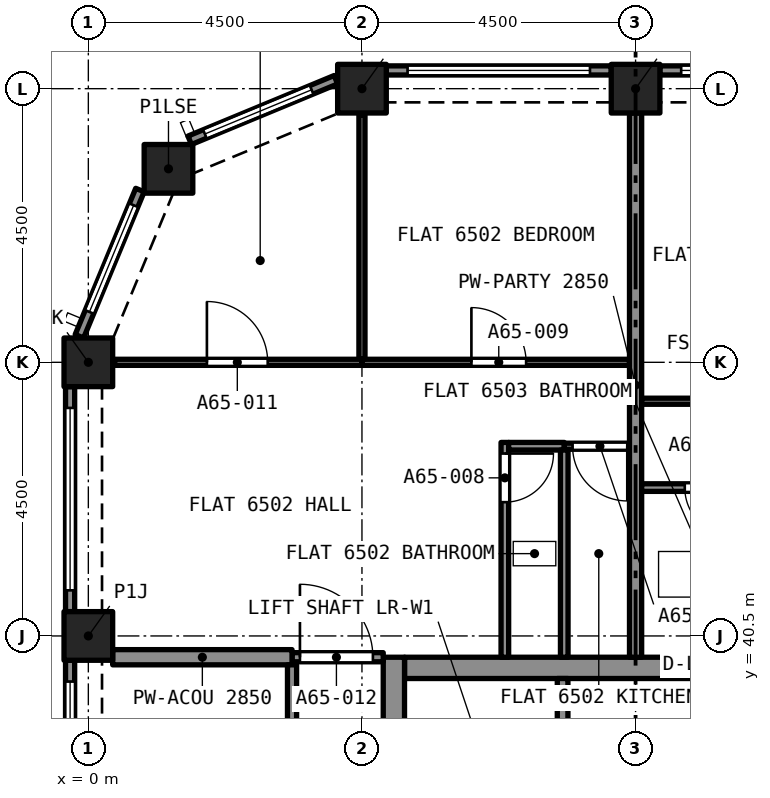
"""IFC4 building model, lengths in metres.
Left out: names, types, materials, properties, quantities, classifications, styles, units other than length and angle.
Written with IfcOpenShell. Run it as: python <this file> out.ifc"""

import sys

from ifc_helpers import new_model, si_unit, direction, frame, frame_2d, origin, origin_2d, place, context, subcontext, project, spatial, rectangle, extrude, element, fill, save


model = new_model("IFC4")
c1 = context("Model", 3, precision=1e-05, world=origin(), true_north=direction((0.0, 1.0)))
c2 = subcontext(c1, "Body", "Model", "MODEL_VIEW")
j1 = project(units=[si_unit("LENGTHUNIT", "METRE"), si_unit("PLANEANGLEUNIT", "RADIAN")], contexts=[c1])
p1 = place(None, origin())
s1 = spatial("IfcSite", under=j1, at=p1, CompositionType="ELEMENT")
p2 = place(p1, origin())
s2 = spatial("IfcBuilding", under=s1, at=p2, CompositionType="ELEMENT")
p3 = place(p2, frame((0.0, 0.0, 232.495)))
s3 = spatial("IfcBuildingStorey", under=s2, at=p3, CompositionType="ELEMENT", Elevation=232.495)
for number, where, z_axis, x_axis in (
    (1, (0.0, 40.5, 0.0), (0.0, 0.0, 1.0), (1.0, 0.0, 0.0)),
    (2, (0.0, 45.0, 0.0), (0.0, 0.0, 1.0), (1.0, 0.0, 0.0)),
    (3, (1.318, 48.182, 0.0), (0.0, 0.0, 1.0), (1.0, 0.0, 0.0)),
    (4, (4.5, 49.5, 0.0), (0.0, 0.0, 1.0), (1.0, 0.0, 0.0)),
    (5, (9.0, 49.5, 0.0), (0.0, 0.0, 1.0), (1.0, 0.0, 0.0)),
):
    element("IfcColumn", number, at=place(p3, frame(where, z_axis=z_axis, x_axis=x_axis)), inside=s3, PredefinedType="COLUMN", context=c2, shape_type="SweptSolid", body=[
        extrude(rectangle(XDim=0.8, YDim=0.8, at=origin_2d()), origin(), (0.0, 0.0, 1.0), 3.2),
    ])
p4 = place(p3, frame((5.2, 39.975, 0.0), z_axis=(0.0, 0.0, 1.0), x_axis=(1.0, 0.0, 0.0)))
e6 = element("IfcWall", 6, at=p4, inside=s3, PredefinedType="SOLIDWALL", context=c2, shape_type="SweptSolid", body=[
    extrude(rectangle(XDim=7.6, YDim=0.35, at=frame_2d((3.8, 0.0))), origin(), (0.0, 0.0, 1.0), 3.2),
])
p5 = place(p3, frame((5.025, 27.35, 0.0), z_axis=(0.0, 0.0, 1.0), x_axis=(0.0, 1.0, 0.0)))
e7 = element("IfcWall", 7, at=p5, inside=s3, PredefinedType="SOLIDWALL", context=c2, shape_type="SweptSolid", body=[
    extrude(rectangle(XDim=12.8, YDim=0.35, at=frame_2d((6.4, 0.0))), origin(), (0.0, 0.0, 1.0), 3.2),
])
p6 = place(p5, frame((8.6, 0.0, 0.0)))
e8 = element("IfcOpeningElement", 8, at=p6, cuts=e7, PredefinedType="OPENING", context=c2, shape_type="SweptSolid", body=[
    extrude(rectangle(XDim=1.2, YDim=2.1, at=frame_2d((0.6, 1.05))), frame((0.0, 0.185, 0.0), z_axis=(0.0, -1.0, 0.0), x_axis=(1.0, 0.0, 0.0)), (0.0, 0.0, 1.0), 0.37),
])
p7 = place(p3, frame((9.4, 49.8, 0.0), z_axis=(0.0, 0.0, 1.0), x_axis=(1.0, 0.0, 0.0)))
e9 = element("IfcWall", 9, at=p7, inside=s3, PredefinedType="SOLIDWALL", context=c2, shape_type="SweptSolid", body=[
    extrude(rectangle(XDim=3.7, YDim=0.15, at=frame_2d((1.85, 0.0))), origin(), (0.0, 0.0, 1.0), 3.2),
])
p8 = place(p7, frame((0.35, 0.0, 0.45)))
e10 = element("IfcOpeningElement", 10, at=p8, cuts=e9, PredefinedType="OPENING", context=c2, shape_type="SweptSolid", body=[
    extrude(rectangle(XDim=3.0, YDim=1.95, at=frame_2d((1.5, 0.975))), frame((0.0, 0.085, 0.0), z_axis=(0.0, -1.0, 0.0), x_axis=(1.0, 0.0, 0.0)), (0.0, 0.0, 1.0), 0.17),
])
p9 = place(p3, frame((4.9, 49.8, 0.0), z_axis=(0.0, 0.0, 1.0), x_axis=(1.0, 0.0, 0.0)))
e11 = element("IfcWall", 11, at=p9, inside=s3, PredefinedType="SOLIDWALL", context=c2, shape_type="SweptSolid", body=[
    extrude(rectangle(XDim=3.7, YDim=0.15, at=frame_2d((1.85, 0.0))), origin(), (0.0, 0.0, 1.0), 3.2),
])
p10 = place(p9, frame((0.35, 0.0, 0.45)))
e12 = element("IfcOpeningElement", 12, at=p10, cuts=e11, PredefinedType="OPENING", context=c2, shape_type="SweptSolid", body=[
    extrude(rectangle(XDim=3.0, YDim=1.95, at=frame_2d((1.5, 0.975))), frame((0.0, 0.085, 0.0), z_axis=(0.0, -1.0, 0.0), x_axis=(1.0, 0.0, 0.0)), (0.0, 0.0, 1.0), 0.17),
])
p11 = place(p3, frame((1.667, 48.651, 0.0), z_axis=(0.0, 0.0, 1.0), x_axis=(0.923885342263, 0.382669406082, 0.0)))
e13 = element("IfcWall", 13, at=p11, inside=s3, PredefinedType="SOLIDWALL", context=c2, shape_type="SweptSolid", body=[
    extrude(rectangle(XDim=2.602, YDim=0.15, at=frame_2d((1.301, 0.0))), origin(), (0.0, 0.0, 1.0), 3.2),
])
p12 = place(p11, frame((0.27, 0.0, 0.45)))
e14 = element("IfcOpeningElement", 14, at=p12, cuts=e13, PredefinedType="OPENING", context=c2, shape_type="SweptSolid", body=[
    extrude(rectangle(XDim=1.9, YDim=1.95, at=frame_2d((0.95, 0.975))), frame((0.0, 0.085, 0.0), z_axis=(0.0, -1.0, 0.0), x_axis=(1.0, 0.0, 0.0)), (0.0, 0.0, 1.0), 0.17),
])
p13 = place(p3, frame((-0.147, 45.429, 0.0), z_axis=(0.0, 0.0, 1.0), x_axis=(0.382669406082, 0.923885342263, 0.0)))
e15 = element("IfcWall", 15, at=p13, inside=s3, PredefinedType="SOLIDWALL", context=c2, shape_type="SweptSolid", body=[
    extrude(rectangle(XDim=2.602, YDim=0.15, at=frame_2d((1.301, 0.0))), origin(), (0.0, 0.0, 1.0), 3.2),
])
p14 = place(p13, frame((0.432, 0.0, 0.45)))
e16 = element("IfcOpeningElement", 16, at=p14, cuts=e15, PredefinedType="OPENING", context=c2, shape_type="SweptSolid", body=[
    extrude(rectangle(XDim=1.9, YDim=1.95, at=frame_2d((0.95, 0.975))), frame((0.0, 0.085, 0.0), z_axis=(0.0, -1.0, 0.0), x_axis=(1.0, 0.0, 0.0)), (0.0, 0.0, 1.0), 0.17),
])
p15 = place(p3, frame((-0.3, 40.9, 0.0), z_axis=(0.0, 0.0, 1.0), x_axis=(0.0, 1.0, 0.0)))
e17 = element("IfcWall", 17, at=p15, inside=s3, PredefinedType="SOLIDWALL", context=c2, shape_type="SweptSolid", body=[
    extrude(rectangle(XDim=3.7, YDim=0.15, at=frame_2d((1.85, 0.0))), origin(), (0.0, 0.0, 1.0), 3.2),
])
p16 = place(p15, frame((0.35, 0.0, 0.45)))
e18 = element("IfcOpeningElement", 18, at=p16, cuts=e17, PredefinedType="OPENING", context=c2, shape_type="SweptSolid", body=[
    extrude(rectangle(XDim=3.0, YDim=1.95, at=frame_2d((1.5, 0.975))), frame((0.0, 0.085, 0.0), z_axis=(0.0, -1.0, 0.0), x_axis=(1.0, 0.0, 0.0)), (0.0, 0.0, 1.0), 0.17),
])
p17 = place(p3, frame((-0.3, 36.4, 0.0), z_axis=(0.0, 0.0, 1.0), x_axis=(0.0, 1.0, 0.0)))
e19 = element("IfcWall", 19, at=p17, inside=s3, PredefinedType="SOLIDWALL", context=c2, shape_type="SweptSolid", body=[
    extrude(rectangle(XDim=3.7, YDim=0.15, at=frame_2d((1.85, 0.0))), origin(), (0.0, 0.0, 1.0), 3.2),
])
p18 = place(p17, frame((0.35, 0.0, 0.45)))
e20 = element("IfcOpeningElement", 20, at=p18, cuts=e19, PredefinedType="OPENING", context=c2, shape_type="SweptSolid", body=[
    extrude(rectangle(XDim=3.0, YDim=1.95, at=frame_2d((1.5, 0.975))), frame((0.0, 0.085, 0.0), z_axis=(0.0, -1.0, 0.0), x_axis=(1.0, 0.0, 0.0)), (0.0, 0.0, 1.0), 0.17),
])
p19 = place(p3, frame((6.85, 43.683, 0.0), z_axis=(0.0, 0.0, 1.0), x_axis=(0.0, -1.0, 0.0)))
e21 = element("IfcWall", 21, at=p19, inside=s3, PredefinedType="PARTITIONING", context=c2, shape_type="SweptSolid", body=[
    extrude(rectangle(XDim=3.533, YDim=0.125, at=frame_2d((1.766, 0.0))), origin(), (0.0, 0.0, 1.0), 2.85),
])
p20 = place(p19, frame((0.183, 0.0, 0.0)))
e22 = element("IfcOpeningElement", 22, at=p20, cuts=e21, PredefinedType="OPENING", context=c2, shape_type="SweptSolid", body=[
    extrude(rectangle(XDim=0.8, YDim=2.1, at=frame_2d((0.4, 1.05))), frame((0.0, 0.073, 0.0), z_axis=(0.0, -1.0, 0.0), x_axis=(1.0, 0.0, 0.0)), (0.0, 0.0, 1.0), 0.145),
])
p21 = place(p3, frame((6.913, 43.62, 0.0), z_axis=(0.0, 0.0, 1.0), x_axis=(1.0, 0.0, 0.0)))
e23 = element("IfcWall", 23, at=p21, inside=s3, PredefinedType="PARTITIONING", context=c2, shape_type="SweptSolid", body=[
    extrude(rectangle(XDim=0.915, YDim=0.125, at=frame_2d((0.458, 0.0))), origin(), (0.0, 0.0, 1.0), 2.85),
])
p22 = place(p3, frame((7.827, 40.15, 0.0), z_axis=(0.0, 0.0, 1.0), x_axis=(0.0, 1.0, 0.0)))
e24 = element("IfcWall", 24, at=p22, inside=s3, PredefinedType="PARTITIONING", context=c2, shape_type="SweptSolid", body=[
    extrude(rectangle(XDim=3.408, YDim=0.125, at=frame_2d((1.704, 0.0))), origin(), (0.0, 0.0, 1.0), 2.85),
])
p23 = place(p3, frame((4.5, 45.0, 0.0), z_axis=(0.0, 0.0, 1.0), x_axis=(1.0, 0.0, 0.0)))
e25 = element("IfcWall", 25, at=p23, inside=s3, PredefinedType="PARTITIONING", context=c2, shape_type="SweptSolid", body=[
    extrude(rectangle(XDim=4.4, YDim=0.1, at=frame_2d((2.2, 0.0))), origin(), (0.0, 0.0, 1.0), 2.85),
])
p24 = place(p23, frame((1.8, 0.0, 0.0)))
e26 = element("IfcOpeningElement", 26, at=p24, cuts=e25, PredefinedType="OPENING", context=c2, shape_type="SweptSolid", body=[
    extrude(rectangle(XDim=0.9, YDim=2.1, at=frame_2d((0.45, 1.05))), frame((0.0, 0.06, 0.0), z_axis=(0.0, -1.0, 0.0), x_axis=(1.0, 0.0, 0.0)), (0.0, 0.0, 1.0), 0.12),
])
p25 = place(p3, frame((4.5, 45.05, 0.0), z_axis=(0.0, 0.0, 1.0), x_axis=(0.0, 1.0, 0.0)))
e27 = element("IfcWall", 27, at=p25, inside=s3, PredefinedType="PARTITIONING", context=c2, shape_type="SweptSolid", body=[
    extrude(rectangle(XDim=4.017, YDim=0.1, at=frame_2d((2.009, 0.0))), origin(), (0.0, 0.0, 1.0), 2.85),
])
p26 = place(p3, frame((8.9, 43.62, 0.0), z_axis=(0.0, 0.0, 1.0), x_axis=(-1.0, 0.0, 0.0)))
e28 = element("IfcWall", 28, at=p26, inside=s3, PredefinedType="PARTITIONING", context=c2, shape_type="SweptSolid", body=[
    extrude(rectangle(XDim=1.073, YDim=0.1, at=frame_2d((0.536, 0.0))), origin(), (0.0, 0.0, 1.0), 2.85),
])
p27 = place(p26, frame((0.036, 0.0, 0.0)))
e29 = element("IfcOpeningElement", 29, at=p27, cuts=e28, PredefinedType="OPENING", context=c2, shape_type="SweptSolid", body=[
    extrude(rectangle(XDim=0.9, YDim=2.1, at=frame_2d((0.45, 1.05))), frame((0.0, 0.06, 0.0), z_axis=(0.0, -1.0, 0.0), x_axis=(1.0, 0.0, 0.0)), (0.0, 0.0, 1.0), 0.12),
])
p28 = place(p3, frame((0.433, 45.0, 0.0), z_axis=(0.0, 0.0, 1.0), x_axis=(1.0, 0.0, 0.0)))
e30 = element("IfcWall", 30, at=p28, inside=s3, PredefinedType="PARTITIONING", context=c2, shape_type="SweptSolid", body=[
    extrude(rectangle(XDim=4.067, YDim=0.1, at=frame_2d((2.034, 0.0))), origin(), (0.0, 0.0, 1.0), 2.85),
])
p29 = place(p28, frame((1.517, 0.0, 0.0)))
e31 = element("IfcOpeningElement", 31, at=p29, cuts=e30, PredefinedType="OPENING", context=c2, shape_type="SweptSolid", body=[
    extrude(rectangle(XDim=1.0, YDim=2.1, at=frame_2d((0.5, 1.05))), frame((0.0, 0.06, 0.0), z_axis=(0.0, -1.0, 0.0), x_axis=(1.0, 0.0, 0.0)), (0.0, 0.0, 1.0), 0.12),
])
p30 = place(p3, frame((3.35, 40.15, 0.0), z_axis=(0.0, 0.0, 1.0), x_axis=(1.0, 0.0, 0.0)))
e32 = element("IfcWall", 32, at=p30, inside=s3, PredefinedType="PARTITIONING", context=c2, shape_type="SweptSolid", body=[
    extrude(rectangle(XDim=1.5, YDim=0.15, at=frame_2d((0.75, 0.0))), origin(), (0.0, 0.0, 1.0), 2.85),
])
p31 = place(p30, frame((0.13, 0.0, 0.0)))
e33 = element("IfcOpeningElement", 33, at=p31, cuts=e32, PredefinedType="OPENING", context=c2, shape_type="SweptSolid", body=[
    extrude(rectangle(XDim=1.2, YDim=2.4, at=frame_2d((0.6, 1.2))), frame((0.0, 0.085, 0.0), z_axis=(0.0, -1.0, 0.0), x_axis=(1.0, 0.0, 0.0)), (0.0, 0.0, 1.0), 0.17),
])
p32 = place(p3, frame((0.4, 40.15, 0.0), z_axis=(0.0, 0.0, 1.0), x_axis=(1.0, 0.0, 0.0)))
e34 = element("IfcWall", 34, at=p32, inside=s3, PredefinedType="PARTITIONING", context=c2, shape_type="SweptSolid", body=[
    extrude(rectangle(XDim=2.95, YDim=0.25, at=frame_2d((1.475, 0.0))), origin(), (0.0, 0.0, 1.0), 2.85),
])
p33 = place(p3, frame((9.0, 40.15, 0.0), z_axis=(0.0, 0.0, 1.0), x_axis=(0.0, 1.0, 0.0)))
e35 = element("IfcWall", 35, at=p33, inside=s3, PredefinedType="PARTITIONING", context=c2, shape_type="SweptSolid", body=[
    extrude(rectangle(XDim=8.95, YDim=0.2, at=frame_2d((4.475, 0.0))), origin(), (0.0, 0.0, 1.0), 2.85),
])
p34 = place(p3, frame((11.418, 42.94, 0.0), z_axis=(0.0, 0.0, 1.0), x_axis=(-1.0, 0.0, 0.0)))
e36 = element("IfcWall", 36, at=p34, inside=s3, PredefinedType="PARTITIONING", context=c2, shape_type="SweptSolid", body=[
    extrude(rectangle(XDim=2.318, YDim=0.125, at=frame_2d((1.159, 0.0))), origin(), (0.0, 0.0, 1.0), 2.85),
])
p35 = place(p34, frame((0.809, 0.0, 0.0)))
e37 = element("IfcOpeningElement", 37, at=p35, cuts=e36, PredefinedType="OPENING", context=c2, shape_type="SweptSolid", body=[
    extrude(rectangle(XDim=0.8, YDim=2.1, at=frame_2d((0.4, 1.05))), frame((0.0, 0.073, 0.0), z_axis=(0.0, -1.0, 0.0), x_axis=(1.0, 0.0, 0.0)), (0.0, 0.0, 1.0), 0.145),
])
p36 = place(p3, frame((9.1, 44.36, 0.0), z_axis=(0.0, 0.0, 1.0), x_axis=(1.0, 0.0, 0.0)))
e38 = element("IfcWall", 38, at=p36, inside=s3, PredefinedType="PARTITIONING", context=c2, shape_type="SweptSolid", body=[
    extrude(rectangle(XDim=4.4, YDim=0.1, at=frame_2d((2.2, 0.0))), origin(), (0.0, 0.0, 1.0), 2.85),
])
p37 = place(p36, frame((1.65, 0.0, 0.0)))
e39 = element("IfcOpeningElement", 39, at=p37, cuts=e38, PredefinedType="OPENING", context=c2, shape_type="SweptSolid", body=[
    extrude(rectangle(XDim=1.0, YDim=2.1, at=frame_2d((0.5, 1.05))), frame((0.0, 0.06, 0.0), z_axis=(0.0, -1.0, 0.0), x_axis=(1.0, 0.0, 0.0)), (0.0, 0.0, 1.0), 0.12),
])
p38 = place(p3, frame((3.35, 36.0, 0.0), z_axis=(0.0, 0.0, 1.0), x_axis=(0.0, 1.0, 0.0)))
e40 = element("IfcWall", 40, at=p38, inside=s3, PredefinedType="PARTITIONING", context=c2, shape_type="SweptSolid", body=[
    extrude(rectangle(XDim=4.025, YDim=0.15, at=frame_2d((2.012, 0.0))), origin(), (0.0, 0.0, 1.0), 2.85),
])
p39 = place(p38, frame((1.575, 0.0, 0.0)))
e41 = element("IfcOpeningElement", 41, at=p39, cuts=e40, PredefinedType="OPENING", context=c2, shape_type="SweptSolid", body=[
    extrude(rectangle(XDim=1.0, YDim=2.1, at=frame_2d((0.5, 1.05))), frame((0.0, 0.085, 0.0), z_axis=(0.0, -1.0, 0.0), x_axis=(1.0, 0.0, 0.0)), (0.0, 0.0, 1.0), 0.17),
])
p40 = place(p3, frame((7.8, 37.5, 0.0), z_axis=(0.0, 0.0, 1.0), x_axis=(0.0, 1.0, 0.0)))
e42 = element("IfcWall", 42, at=p40, inside=s3, PredefinedType="SOLIDWALL", context=c2, shape_type="SweptSolid", body=[
    extrude(rectangle(XDim=2.3, YDim=0.175, at=frame_2d((1.15, 0.0))), origin(), (0.0, 0.0, 1.0), 2.85),
])
p41 = place(p8, origin())
e43 = element("IfcWindow", 43, at=p41, inside=s3, PartitioningType="SINGLE_PANEL", PredefinedType="WINDOW", context=c2, shape_type="SweptSolid", body=[
    extrude(rectangle(XDim=3.0, YDim=1.95, at=frame_2d((1.5, 0.975))), frame((0.0, 0.03, 0.0), z_axis=(0.0, -1.0, 0.0), x_axis=(1.0, 0.0, 0.0)), (0.0, 0.0, 1.0), 0.06),
])
fill(e10, e43)
p42 = place(p10, origin())
e44 = element("IfcWindow", 44, at=p42, inside=s3, PartitioningType="SINGLE_PANEL", PredefinedType="WINDOW", context=c2, shape_type="SweptSolid", body=[
    extrude(rectangle(XDim=3.0, YDim=1.95, at=frame_2d((1.5, 0.975))), frame((0.0, 0.03, 0.0), z_axis=(0.0, -1.0, 0.0), x_axis=(1.0, 0.0, 0.0)), (0.0, 0.0, 1.0), 0.06),
])
fill(e12, e44)
p43 = place(p12, origin())
e45 = element("IfcWindow", 45, at=p43, inside=s3, PartitioningType="SINGLE_PANEL", PredefinedType="WINDOW", context=c2, shape_type="SweptSolid", body=[
    extrude(rectangle(XDim=1.9, YDim=1.95, at=frame_2d((0.95, 0.975))), frame((0.0, 0.03, 0.0), z_axis=(0.0, -1.0, 0.0), x_axis=(1.0, 0.0, 0.0)), (0.0, 0.0, 1.0), 0.06),
])
fill(e14, e45)
p44 = place(p14, origin())
e46 = element("IfcWindow", 46, at=p44, inside=s3, PartitioningType="SINGLE_PANEL", PredefinedType="WINDOW", context=c2, shape_type="SweptSolid", body=[
    extrude(rectangle(XDim=1.9, YDim=1.95, at=frame_2d((0.95, 0.975))), frame((0.0, 0.03, 0.0), z_axis=(0.0, -1.0, 0.0), x_axis=(1.0, 0.0, 0.0)), (0.0, 0.0, 1.0), 0.06),
])
fill(e16, e46)
p45 = place(p16, origin())
e47 = element("IfcWindow", 47, at=p45, inside=s3, PartitioningType="SINGLE_PANEL", PredefinedType="WINDOW", context=c2, shape_type="SweptSolid", body=[
    extrude(rectangle(XDim=3.0, YDim=1.95, at=frame_2d((1.5, 0.975))), frame((0.0, 0.03, 0.0), z_axis=(0.0, -1.0, 0.0), x_axis=(1.0, 0.0, 0.0)), (0.0, 0.0, 1.0), 0.06),
])
fill(e18, e47)
p46 = place(p18, origin())
e48 = element("IfcWindow", 48, at=p46, inside=s3, PartitioningType="SINGLE_PANEL", PredefinedType="WINDOW", context=c2, shape_type="SweptSolid", body=[
    extrude(rectangle(XDim=3.0, YDim=1.95, at=frame_2d((1.5, 0.975))), frame((0.0, 0.03, 0.0), z_axis=(0.0, -1.0, 0.0), x_axis=(1.0, 0.0, 0.0)), (0.0, 0.0, 1.0), 0.06),
])
fill(e20, e48)
p47 = place(p20, origin())
e49 = element("IfcDoor", 49, at=p47, inside=s3, OperationType="SINGLE_SWING_LEFT", PredefinedType="DOOR", context=c2, shape_type="SweptSolid", body=[
    extrude(rectangle(XDim=0.8, YDim=2.1, at=frame_2d((0.4, 1.05))), frame((0.0, 0.025, 0.0), z_axis=(0.0, -1.0, 0.0), x_axis=(1.0, 0.0, 0.0)), (0.0, 0.0, 1.0), 0.05),
])
fill(e22, e49)
p48 = place(p24, origin())
e50 = element("IfcDoor", 50, at=p48, inside=s3, OperationType="SINGLE_SWING_RIGHT", PredefinedType="DOOR", context=c2, shape_type="SweptSolid", body=[
    extrude(rectangle(XDim=0.9, YDim=2.1, at=frame_2d((0.45, 1.05))), frame((0.0, 0.025, 0.0), z_axis=(0.0, -1.0, 0.0), x_axis=(1.0, 0.0, 0.0)), (0.0, 0.0, 1.0), 0.05),
])
fill(e26, e50)
p49 = place(p27, origin())
e51 = element("IfcDoor", 51, at=p49, inside=s3, OperationType="SINGLE_SWING_LEFT", PredefinedType="DOOR", context=c2, shape_type="SweptSolid", body=[
    extrude(rectangle(XDim=0.9, YDim=2.1, at=frame_2d((0.45, 1.05))), frame((0.0, 0.025, 0.0), z_axis=(0.0, -1.0, 0.0), x_axis=(1.0, 0.0, 0.0)), (0.0, 0.0, 1.0), 0.05),
])
fill(e29, e51)
p50 = place(p29, origin())
e52 = element("IfcDoor", 52, at=p50, inside=s3, OperationType="SINGLE_SWING_LEFT", PredefinedType="DOOR", context=c2, shape_type="SweptSolid", body=[
    extrude(rectangle(XDim=1.0, YDim=2.1, at=frame_2d((0.5, 1.05))), frame((0.0, 0.025, 0.0), z_axis=(0.0, -1.0, 0.0), x_axis=(1.0, 0.0, 0.0)), (0.0, 0.0, 1.0), 0.05),
])
fill(e31, e52)
p51 = place(p31, origin())
e53 = element("IfcDoor", 53, at=p51, inside=s3, OperationType="SINGLE_SWING_LEFT", PredefinedType="DOOR", context=c2, shape_type="SweptSolid", body=[
    extrude(rectangle(XDim=1.2, YDim=2.4, at=frame_2d((0.6, 1.2))), frame((0.0, 0.025, 0.0), z_axis=(0.0, -1.0, 0.0), x_axis=(1.0, 0.0, 0.0)), (0.0, 0.0, 1.0), 0.05),
])
fill(e33, e53)
p52 = place(p35, origin())
e54 = element("IfcDoor", 54, at=p52, inside=s3, OperationType="SINGLE_SWING_RIGHT", PredefinedType="DOOR", context=c2, shape_type="SweptSolid", body=[
    extrude(rectangle(XDim=0.8, YDim=2.1, at=frame_2d((0.4, 1.05))), frame((0.0, 0.025, 0.0), z_axis=(0.0, -1.0, 0.0), x_axis=(1.0, 0.0, 0.0)), (0.0, 0.0, 1.0), 0.05),
])
fill(e37, e54)
save(model, sys.argv[1])
